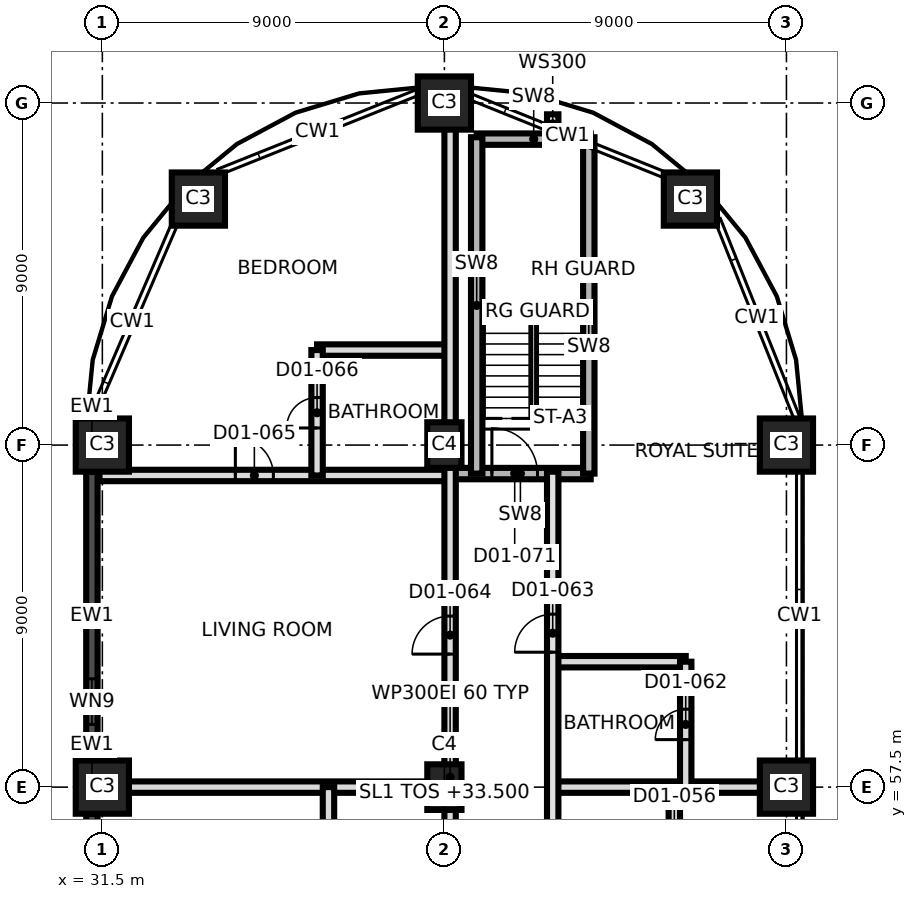
"""IFC4 building model, lengths in metres.
Left out: names, types, materials, properties, quantities, classifications, styles, units other than length and angle.
Written with IfcOpenShell. Run it as: python <this file> out.ifc"""

import sys

from ifc_helpers import new_model, si_unit, direction, frame, frame_2d, origin, origin_2d, place, context, subcontext, project, spatial, rectangle, extrude, element, fill, save


model = new_model("IFC4")
c1 = context("Model", 3, precision=1e-05, world=origin(), true_north=direction((0.0, 1.0)))
c2 = subcontext(c1, "Body", "Model", "MODEL_VIEW")
j1 = project(units=[si_unit("LENGTHUNIT", "METRE"), si_unit("PLANEANGLEUNIT", "RADIAN")], contexts=[c1])
p1 = place(None, origin())
s1 = spatial("IfcSite", under=j1, at=p1, CompositionType="ELEMENT")
p2 = place(p1, origin())
s2 = spatial("IfcBuilding", under=s1, at=p2, CompositionType="ELEMENT")
p3 = place(p2, frame((0.0, 0.0, 33.5)))
s3 = spatial("IfcBuildingStorey", under=s2, at=p3, CompositionType="ELEMENT", Elevation=33.5)
p4 = place(p3, frame((31.5, 57.5, 0.0), z_axis=(0.0, 0.0, 1.0), x_axis=(1.0, 0.0, 0.0)))
e1 = element("IfcColumn", 1, at=p4, inside=s3, PredefinedType="COLUMN", context=c2, shape_type="SweptSolid", body=[
    extrude(rectangle(XDim=1.4, YDim=1.4, at=origin_2d()), origin(), (0.0, 0.0, 1.0), 3.7),
])
p5 = place(p3, frame((40.5, 57.5, 0.0), z_axis=(0.0, 0.0, 1.0), x_axis=(0.0, 1.0, 0.0)))
e2 = element("IfcColumn", 2, at=p5, inside=s3, PredefinedType="COLUMN", context=c2, shape_type="SweptSolid", body=[
    extrude(rectangle(XDim=1.2, YDim=0.9, at=origin_2d()), origin(), (0.0, 0.0, 1.0), 3.7),
])
for number, where, z_axis, x_axis in (
    (3, (49.5, 57.5, 0.0), (0.0, 0.0, 1.0), (1.0, 0.0, 0.0)),
    (4, (31.5, 66.5, 0.0), (0.0, 0.0, 1.0), (1.0, 0.0, 0.0)),
):
    element("IfcColumn", number, at=place(p3, frame(where, z_axis=z_axis, x_axis=x_axis)), inside=s3, PredefinedType="COLUMN", context=c2, shape_type="SweptSolid", body=[
        extrude(rectangle(XDim=1.4, YDim=1.4, at=origin_2d()), origin(), (0.0, 0.0, 1.0), 3.7),
    ])
p6 = place(p3, frame((40.5, 66.5, 0.0), z_axis=(0.0, 0.0, 1.0), x_axis=(0.0, 1.0, 0.0)))
e5 = element("IfcColumn", 5, at=p6, inside=s3, PredefinedType="COLUMN", context=c2, shape_type="SweptSolid", body=[
    extrude(rectangle(XDim=1.2, YDim=0.9, at=origin_2d()), origin(), (0.0, 0.0, 1.0), 3.7),
])
for number, where, z_axis, x_axis in (
    (6, (49.5, 66.5, 0.0), (0.0, 0.0, 1.0), (1.0, 0.0, 0.0)),
    (7, (34.027, 72.973, 0.0), (0.0, 0.0, 1.0), (1.0, 0.0, 0.0)),
    (8, (46.973, 72.973, 0.0), (0.0, 0.0, 1.0), (1.0, 0.0, 0.0)),
    (9, (40.5, 75.5, 0.0), (0.0, 0.0, 1.0), (1.0, 0.0, 0.0)),
):
    element("IfcColumn", number, at=place(p3, frame(where, z_axis=z_axis, x_axis=x_axis)), inside=s3, PredefinedType="COLUMN", context=c2, shape_type="SweptSolid", body=[
        extrude(rectangle(XDim=1.4, YDim=1.4, at=origin_2d()), origin(), (0.0, 0.0, 1.0), 3.7),
    ])
p7 = place(p3, frame((31.225, 66.992, 0.0), z_axis=(0.0, 0.0, 1.0), x_axis=(0.0, -1.0, 0.0)))
e10 = element("IfcWall", 10, at=p7, inside=s3, PredefinedType="SOLIDWALL", context=c2, shape_type="SweptSolid", body=[
    extrude(rectangle(XDim=1.192, YDim=0.3, at=frame_2d((0.596, 0.0))), origin(), (0.0, 0.0, 1.0), 3.4),
])
p8 = place(p3, frame((31.225, 65.8, 0.0), z_axis=(0.0, 0.0, 1.0), x_axis=(0.0, -1.0, 0.0)))
e11 = element("IfcWall", 11, at=p8, inside=s3, PredefinedType="SOLIDWALL", context=c2, shape_type="SweptSolid", body=[
    extrude(rectangle(XDim=7.6, YDim=0.3, at=frame_2d((3.8, 0.0))), origin(), (0.0, 0.0, 1.0), 2.7),
])
p9 = place(p8, frame((5.45, 0.0, 0.9)))
e12 = element("IfcOpeningElement", 12, at=p9, cuts=e11, PredefinedType="OPENING", context=c2, shape_type="SweptSolid", body=[
    extrude(rectangle(XDim=1.2, YDim=1.5, at=frame_2d((0.6, 0.75))), frame((0.0, 0.16, 0.0), z_axis=(0.0, -1.0, 0.0), x_axis=(1.0, 0.0, 0.0)), (0.0, 0.0, 1.0), 0.32),
])
p10 = place(p3, frame((31.225, 58.2, 0.0), z_axis=(0.0, 0.0, 1.0), x_axis=(0.0, -1.0, 0.0)))
e13 = element("IfcWall", 13, at=p10, inside=s3, PredefinedType="SOLIDWALL", context=c2, shape_type="SweptSolid", body=[
    extrude(rectangle(XDim=1.4, YDim=0.3, at=frame_2d((0.7, 0.0))), origin(), (0.0, 0.0, 1.0), 3.4),
])
p11 = place(p3, frame((31.225, 56.8, 0.0), z_axis=(0.0, 0.0, 1.0), x_axis=(0.0, -1.0, 0.0)))
e14 = element("IfcWall", 14, at=p11, inside=s3, PredefinedType="SOLIDWALL", context=c2, shape_type="SweptSolid", body=[
    extrude(rectangle(XDim=7.6, YDim=0.3, at=frame_2d((3.8, 0.0))), origin(), (0.0, 0.0, 1.0), 2.7),
])
p12 = place(p11, frame((0.95, 0.0, 0.9)))
e15 = element("IfcOpeningElement", 15, at=p12, cuts=e14, PredefinedType="OPENING", context=c2, shape_type="SweptSolid", body=[
    extrude(rectangle(XDim=1.2, YDim=1.5, at=frame_2d((0.6, 0.75))), frame((0.0, 0.16, 0.0), z_axis=(0.0, -1.0, 0.0), x_axis=(1.0, 0.0, 0.0)), (0.0, 0.0, 1.0), 0.32),
])
p13 = place(p11, frame((5.45, 0.0, 0.9)))
e16 = element("IfcOpeningElement", 16, at=p13, cuts=e14, PredefinedType="OPENING", context=c2, shape_type="SweptSolid", body=[
    extrude(rectangle(XDim=1.2, YDim=1.5, at=frame_2d((0.6, 0.75))), frame((0.0, 0.16, 0.0), z_axis=(0.0, -1.0, 0.0), x_axis=(1.0, 0.0, 0.0)), (0.0, 0.0, 1.0), 0.32),
])
p14 = place(p3, frame((31.425, 57.5, 0.0), z_axis=(0.0, 0.0, 1.0), x_axis=(1.0, 0.0, 0.0)))
e17 = element("IfcWall", 17, at=p14, inside=s3, PredefinedType="PARTITIONING", context=c2, shape_type="SweptSolid", body=[
    extrude(rectangle(XDim=9.225, YDim=0.3, at=frame_2d((4.612, 0.0))), origin(), (0.0, 0.0, 1.0), 3.4),
])
p15 = place(p3, frame((43.35, 57.5, 0.0), z_axis=(0.0, 0.0, 1.0), x_axis=(1.0, 0.0, 0.0)))
e18 = element("IfcWall", 18, at=p15, inside=s3, PredefinedType="PARTITIONING", context=c2, shape_type="SweptSolid", body=[
    extrude(rectangle(XDim=6.225, YDim=0.3, at=frame_2d((3.112, 0.0))), origin(), (0.0, 0.0, 1.0), 3.4),
])
p16 = place(p3, frame((43.35, 60.8, 0.0), z_axis=(0.0, 0.0, 1.0), x_axis=(1.0, 0.0, 0.0)))
e19 = element("IfcWall", 19, at=p16, inside=s3, PredefinedType="PARTITIONING", context=c2, shape_type="SweptSolid", body=[
    extrude(rectangle(XDim=3.5, YDim=0.3, at=frame_2d((1.75, 0.0))), origin(), (0.0, 0.0, 1.0), 3.4),
])
p17 = place(p3, frame((31.425, 65.7, 0.0), z_axis=(0.0, 0.0, 1.0), x_axis=(1.0, 0.0, 0.0)))
e20 = element("IfcWall", 20, at=p17, inside=s3, PredefinedType="PARTITIONING", context=c2, shape_type="SweptSolid", body=[
    extrude(rectangle(XDim=9.225, YDim=0.3, at=frame_2d((4.612, 0.0))), origin(), (0.0, 0.0, 1.0), 3.4),
])
p18 = place(p17, frame((3.575, 0.0, 0.0)))
e21 = element("IfcOpeningElement", 21, at=p18, cuts=e20, PredefinedType="OPENING", context=c2, shape_type="SweptSolid", body=[
    extrude(rectangle(XDim=1.0, YDim=2.1, at=frame_2d((0.5, 1.05))), frame((0.0, 0.16, 0.0), z_axis=(0.0, -1.0, 0.0), x_axis=(1.0, 0.0, 0.0)), (0.0, 0.0, 1.0), 0.32),
])
p19 = place(p3, frame((40.65, 65.75, 0.0), z_axis=(0.0, 0.0, 1.0), x_axis=(1.0, 0.0, 0.0)))
e22 = element("IfcWall", 22, at=p19, inside=s3, PredefinedType="SHEAR", context=c2, shape_type="SweptSolid", body=[
    extrude(rectangle(XDim=3.7, YDim=0.3, at=frame_2d((1.85, 0.0))), origin(), (0.0, 0.0, 1.0), 3.4),
])
p20 = place(p19, frame((1.1, 0.0, 0.0)))
e23 = element("IfcOpeningElement", 23, at=p20, cuts=e22, PredefinedType="OPENING", context=c2, shape_type="SweptSolid", body=[
    extrude(rectangle(XDim=1.2, YDim=2.1, at=frame_2d((0.6, 1.05))), frame((0.0, 0.16, 0.0), z_axis=(0.0, -1.0, 0.0), x_axis=(1.0, 0.0, 0.0)), (0.0, 0.0, 1.0), 0.32),
])
p21 = place(p3, frame((37.15, 69.0, 0.0), z_axis=(0.0, 0.0, 1.0), x_axis=(1.0, 0.0, 0.0)))
e24 = element("IfcWall", 24, at=p21, inside=s3, PredefinedType="PARTITIONING", context=c2, shape_type="SweptSolid", body=[
    extrude(rectangle(XDim=3.5, YDim=0.3, at=frame_2d((1.75, 0.0))), origin(), (0.0, 0.0, 1.0), 3.4),
])
p22 = place(p3, frame((41.35, 74.55, 0.0), z_axis=(0.0, 0.0, 1.0), x_axis=(1.0, 0.0, 0.0)))
e25 = element("IfcWall", 25, at=p22, inside=s3, PredefinedType="SHEAR", context=c2, shape_type="SweptSolid", body=[
    extrude(rectangle(XDim=3.0, YDim=0.3, at=frame_2d((1.5, 0.0))), origin(), (0.0, 0.0, 1.0), 3.4),
])
p23 = place(p3, frame((37.15, 65.7, 0.0), z_axis=(0.0, 0.0, 1.0), x_axis=(0.0, 1.0, 0.0)))
e26 = element("IfcWall", 26, at=p23, inside=s3, PredefinedType="PARTITIONING", context=c2, shape_type="SweptSolid", body=[
    extrude(rectangle(XDim=3.3, YDim=0.3, at=frame_2d((1.65, 0.0))), origin(), (0.0, 0.0, 1.0), 3.4),
])
p24 = place(p23, frame((1.25, 0.0, 0.0)))
e27 = element("IfcOpeningElement", 27, at=p24, cuts=e26, PredefinedType="OPENING", context=c2, shape_type="SweptSolid", body=[
    extrude(rectangle(XDim=0.8, YDim=2.1, at=frame_2d((0.4, 1.05))), frame((0.0, 0.16, 0.0), z_axis=(0.0, -1.0, 0.0), x_axis=(1.0, 0.0, 0.0)), (0.0, 0.0, 1.0), 0.32),
])
p25 = place(p3, frame((37.45, 54.8, 0.0), z_axis=(0.0, 0.0, 1.0), x_axis=(0.0, 1.0, 0.0)))
e28 = element("IfcWall", 28, at=p25, inside=s3, PredefinedType="PARTITIONING", context=c2, shape_type="SweptSolid", body=[
    extrude(rectangle(XDim=2.7, YDim=0.3, at=frame_2d((1.35, 0.0))), origin(), (0.0, 0.0, 1.0), 3.4),
])
p26 = place(p25, frame((0.95, 0.0, 0.0)))
e29 = element("IfcOpeningElement", 29, at=p26, cuts=e28, PredefinedType="OPENING", context=c2, shape_type="SweptSolid", body=[
    extrude(rectangle(XDim=0.8, YDim=2.1, at=frame_2d((0.4, 1.05))), frame((0.0, 0.16, 0.0), z_axis=(0.0, -1.0, 0.0), x_axis=(1.0, 0.0, 0.0)), (0.0, 0.0, 1.0), 0.32),
])
p27 = place(p3, frame((40.65, 39.95, 0.0), z_axis=(0.0, 0.0, 1.0), x_axis=(0.0, 1.0, 0.0)))
e30 = element("IfcWall", 30, at=p27, inside=s3, PredefinedType="PARTITIONING", context=c2, shape_type="SweptSolid", body=[
    extrude(rectangle(XDim=35.625, YDim=0.3, at=frame_2d((17.812, 0.0))), origin(), (0.0, 0.0, 1.0), 3.4),
])
p28 = place(p27, frame((2.83, 0.0, 0.0)))
e31 = element("IfcOpeningElement", 31, at=p28, cuts=e30, PredefinedType="OPENING", context=c2, shape_type="SweptSolid", body=[
    extrude(rectangle(XDim=1.0, YDim=2.1, at=frame_2d((0.5, 1.05))), frame((0.0, 0.16, 0.0), z_axis=(0.0, -1.0, 0.0), x_axis=(1.0, 0.0, 0.0)), (0.0, 0.0, 1.0), 0.32),
])
p29 = place(p27, frame((4.63, 0.0, 0.0)))
e32 = element("IfcOpeningElement", 32, at=p29, cuts=e30, PredefinedType="OPENING", context=c2, shape_type="SweptSolid", body=[
    extrude(rectangle(XDim=1.0, YDim=2.1, at=frame_2d((0.5, 1.05))), frame((0.0, 0.16, 0.0), z_axis=(0.0, -1.0, 0.0), x_axis=(1.0, 0.0, 0.0)), (0.0, 0.0, 1.0), 0.32),
])
p30 = place(p27, frame((11.47, 0.0, 0.0)))
e33 = element("IfcOpeningElement", 33, at=p30, cuts=e30, PredefinedType="OPENING", context=c2, shape_type="SweptSolid", body=[
    extrude(rectangle(XDim=1.0, YDim=2.1, at=frame_2d((0.5, 1.05))), frame((0.0, 0.16, 0.0), z_axis=(0.0, -1.0, 0.0), x_axis=(1.0, 0.0, 0.0)), (0.0, 0.0, 1.0), 0.32),
])
p31 = place(p27, frame((13.27, 0.0, 0.0)))
e34 = element("IfcOpeningElement", 34, at=p31, cuts=e30, PredefinedType="OPENING", context=c2, shape_type="SweptSolid", body=[
    extrude(rectangle(XDim=1.0, YDim=2.1, at=frame_2d((0.5, 1.05))), frame((0.0, 0.16, 0.0), z_axis=(0.0, -1.0, 0.0), x_axis=(1.0, 0.0, 0.0)), (0.0, 0.0, 1.0), 0.32),
])
p32 = place(p27, frame((21.05, 0.0, 0.0)))
e35 = element("IfcOpeningElement", 35, at=p32, cuts=e30, PredefinedType="OPENING", context=c2, shape_type="SweptSolid", body=[
    extrude(rectangle(XDim=1.0, YDim=2.4, at=frame_2d((0.5, 1.2))), frame((0.0, 0.16, 0.0), z_axis=(0.0, -1.0, 0.0), x_axis=(1.0, 0.0, 0.0)), (0.0, 0.0, 1.0), 0.32),
])
p33 = place(p3, frame((41.35, 65.75, 0.0), z_axis=(0.0, 0.0, 1.0), x_axis=(0.0, 1.0, 0.0)))
e36 = element("IfcWall", 36, at=p33, inside=s3, PredefinedType="SHEAR", context=c2, shape_type="SweptSolid", body=[
    extrude(rectangle(XDim=8.85, YDim=0.3, at=frame_2d((4.425, 0.0))), origin(), (0.0, 0.0, 1.0), 3.4),
])
p34 = place(p3, frame((43.35, 39.95, 0.0), z_axis=(0.0, 0.0, 1.0), x_axis=(0.0, 1.0, 0.0)))
e37 = element("IfcWall", 37, at=p34, inside=s3, PredefinedType="SOLIDWALL", context=c2, shape_type="SweptSolid", body=[
    extrude(rectangle(XDim=25.85, YDim=0.3, at=frame_2d((12.925, 0.0))), origin(), (0.0, 0.0, 1.0), 3.4),
])
p35 = place(p34, frame((2.47, 0.0, 0.0)))
e38 = element("IfcOpeningElement", 38, at=p35, cuts=e37, PredefinedType="OPENING", context=c2, shape_type="SweptSolid", body=[
    extrude(rectangle(XDim=1.0, YDim=2.1, at=frame_2d((0.5, 1.05))), frame((0.0, 0.16, 0.0), z_axis=(0.0, -1.0, 0.0), x_axis=(1.0, 0.0, 0.0)), (0.0, 0.0, 1.0), 0.32),
])
p36 = place(p34, frame((4.27, 0.0, 0.0)))
e39 = element("IfcOpeningElement", 39, at=p36, cuts=e37, PredefinedType="OPENING", context=c2, shape_type="SweptSolid", body=[
    extrude(rectangle(XDim=1.0, YDim=2.1, at=frame_2d((0.5, 1.05))), frame((0.0, 0.16, 0.0), z_axis=(0.0, -1.0, 0.0), x_axis=(1.0, 0.0, 0.0)), (0.0, 0.0, 1.0), 0.32),
])
p37 = place(p34, frame((11.65, 0.0, 0.0)))
e40 = element("IfcOpeningElement", 40, at=p37, cuts=e37, PredefinedType="OPENING", context=c2, shape_type="SweptSolid", body=[
    extrude(rectangle(XDim=1.0, YDim=2.1, at=frame_2d((0.5, 1.05))), frame((0.0, 0.16, 0.0), z_axis=(0.0, -1.0, 0.0), x_axis=(1.0, 0.0, 0.0)), (0.0, 0.0, 1.0), 0.32),
])
p38 = place(p34, frame((13.45, 0.0, 0.0)))
e41 = element("IfcOpeningElement", 41, at=p38, cuts=e37, PredefinedType="OPENING", context=c2, shape_type="SweptSolid", body=[
    extrude(rectangle(XDim=1.0, YDim=2.1, at=frame_2d((0.5, 1.05))), frame((0.0, 0.16, 0.0), z_axis=(0.0, -1.0, 0.0), x_axis=(1.0, 0.0, 0.0)), (0.0, 0.0, 1.0), 0.32),
])
p39 = place(p34, frame((21.1, 0.0, 0.0)))
e42 = element("IfcOpeningElement", 42, at=p39, cuts=e37, PredefinedType="OPENING", context=c2, shape_type="SweptSolid", body=[
    extrude(rectangle(XDim=1.0, YDim=2.4, at=frame_2d((0.5, 1.2))), frame((0.0, 0.16, 0.0), z_axis=(0.0, -1.0, 0.0), x_axis=(1.0, 0.0, 0.0)), (0.0, 0.0, 1.0), 0.32),
])
p40 = place(p3, frame((43.35, 74.699, 0.0), z_axis=(0.0, 0.0, 1.0), x_axis=(0.0, 1.0, 0.0)))
e43 = element("IfcWall", 43, at=p40, inside=s3, PredefinedType="SOLIDWALL", context=c2, shape_type="SweptSolid", body=[
    extrude(rectangle(XDim=0.504, YDim=0.3, at=frame_2d((0.252, 0.0))), origin(), (0.0, 0.0, 1.0), 3.4),
])
p41 = place(p3, frame((44.3, 65.75, 0.0), z_axis=(0.0, 0.0, 1.0), x_axis=(0.0, 1.0, 0.0)))
e44 = element("IfcWall", 44, at=p41, inside=s3, PredefinedType="SHEAR", context=c2, shape_type="SweptSolid", body=[
    extrude(rectangle(XDim=8.85, YDim=0.3, at=frame_2d((4.425, 0.0))), origin(), (0.0, 0.0, 1.0), 3.4),
])
p42 = place(p3, frame((46.55, 54.8, 0.0), z_axis=(0.0, 0.0, 1.0), x_axis=(0.0, 1.0, 0.0)))
e45 = element("IfcWall", 45, at=p42, inside=s3, PredefinedType="PARTITIONING", context=c2, shape_type="SweptSolid", body=[
    extrude(rectangle(XDim=2.7, YDim=0.3, at=frame_2d((1.35, 0.0))), origin(), (0.0, 0.0, 1.0), 3.4),
])
p43 = place(p42, frame((0.95, 0.0, 0.0)))
e46 = element("IfcOpeningElement", 46, at=p43, cuts=e45, PredefinedType="OPENING", context=c2, shape_type="SweptSolid", body=[
    extrude(rectangle(XDim=0.8, YDim=2.1, at=frame_2d((0.4, 1.05))), frame((0.0, 0.16, 0.0), z_axis=(0.0, -1.0, 0.0), x_axis=(1.0, 0.0, 0.0)), (0.0, 0.0, 1.0), 0.32),
])
p44 = place(p3, frame((46.85, 57.5, 0.0), z_axis=(0.0, 0.0, 1.0), x_axis=(0.0, 1.0, 0.0)))
e47 = element("IfcWall", 47, at=p44, inside=s3, PredefinedType="PARTITIONING", context=c2, shape_type="SweptSolid", body=[
    extrude(rectangle(XDim=3.3, YDim=0.3, at=frame_2d((1.65, 0.0))), origin(), (0.0, 0.0, 1.0), 3.4),
])
p45 = place(p44, frame((1.25, 0.0, 0.0)))
e48 = element("IfcOpeningElement", 48, at=p45, cuts=e47, PredefinedType="OPENING", context=c2, shape_type="SweptSolid", body=[
    extrude(rectangle(XDim=0.8, YDim=2.1, at=frame_2d((0.4, 1.05))), frame((0.0, 0.16, 0.0), z_axis=(0.0, -1.0, 0.0), x_axis=(1.0, 0.0, 0.0)), (0.0, 0.0, 1.0), 0.32),
])
p46 = place(p9, origin())
e49 = element("IfcWindow", 49, at=p46, inside=s3, PartitioningType="SINGLE_PANEL", PredefinedType="WINDOW", context=c2, shape_type="SweptSolid", body=[
    extrude(rectangle(XDim=1.2, YDim=1.5, at=frame_2d((0.6, 0.75))), frame((0.0, 0.03, 0.0), z_axis=(0.0, -1.0, 0.0), x_axis=(1.0, 0.0, 0.0)), (0.0, 0.0, 1.0), 0.06),
])
fill(e12, e49)
p47 = place(p45, origin())
e50 = element("IfcDoor", 50, at=p47, inside=s3, OperationType="SINGLE_SWING_LEFT", PredefinedType="DOOR", context=c2, shape_type="SweptSolid", body=[
    extrude(rectangle(XDim=0.8, YDim=2.1, at=frame_2d((0.4, 1.05))), frame((0.0, 0.025, 0.0), z_axis=(0.0, -1.0, 0.0), x_axis=(1.0, 0.0, 0.0)), (0.0, 0.0, 1.0), 0.05),
])
fill(e48, e50)
p48 = place(p39, origin())
e51 = element("IfcDoor", 51, at=p48, inside=s3, OperationType="SINGLE_SWING_RIGHT", PredefinedType="DOOR", context=c2, shape_type="SweptSolid", body=[
    extrude(rectangle(XDim=1.0, YDim=2.4, at=frame_2d((0.5, 1.2))), frame((0.0, 0.025, 0.0), z_axis=(0.0, -1.0, 0.0), x_axis=(1.0, 0.0, 0.0)), (0.0, 0.0, 1.0), 0.05),
])
fill(e42, e51)
p49 = place(p32, origin())
e52 = element("IfcDoor", 52, at=p49, inside=s3, OperationType="SINGLE_SWING_LEFT", PredefinedType="DOOR", context=c2, shape_type="SweptSolid", body=[
    extrude(rectangle(XDim=1.0, YDim=2.4, at=frame_2d((0.5, 1.2))), frame((0.0, 0.025, 0.0), z_axis=(0.0, -1.0, 0.0), x_axis=(1.0, 0.0, 0.0)), (0.0, 0.0, 1.0), 0.05),
])
fill(e35, e52)
p50 = place(p18, origin())
e53 = element("IfcDoor", 53, at=p50, inside=s3, OperationType="SINGLE_SWING_RIGHT", PredefinedType="DOOR", context=c2, shape_type="SweptSolid", body=[
    extrude(rectangle(XDim=1.0, YDim=2.1, at=frame_2d((0.5, 1.05))), frame((0.0, 0.025, 0.0), z_axis=(0.0, -1.0, 0.0), x_axis=(1.0, 0.0, 0.0)), (0.0, 0.0, 1.0), 0.05),
])
fill(e21, e53)
p51 = place(p24, origin())
e54 = element("IfcDoor", 54, at=p51, inside=s3, OperationType="SINGLE_SWING_LEFT", PredefinedType="DOOR", context=c2, shape_type="SweptSolid", body=[
    extrude(rectangle(XDim=0.8, YDim=2.1, at=frame_2d((0.4, 1.05))), frame((0.0, 0.025, 0.0), z_axis=(0.0, -1.0, 0.0), x_axis=(1.0, 0.0, 0.0)), (0.0, 0.0, 1.0), 0.05),
])
fill(e27, e54)
p52 = place(p20, origin())
e55 = element("IfcDoor", 55, at=p52, inside=s3, OperationType="SINGLE_SWING_RIGHT", PredefinedType="DOOR", context=c2, shape_type="SweptSolid", body=[
    extrude(rectangle(XDim=1.2, YDim=2.1, at=frame_2d((0.6, 1.05))), frame((0.0, 0.025, 0.0), z_axis=(0.0, -1.0, 0.0), x_axis=(1.0, 0.0, 0.0)), (0.0, 0.0, 1.0), 0.05),
])
fill(e23, e55)
save(model, sys.argv[1])
